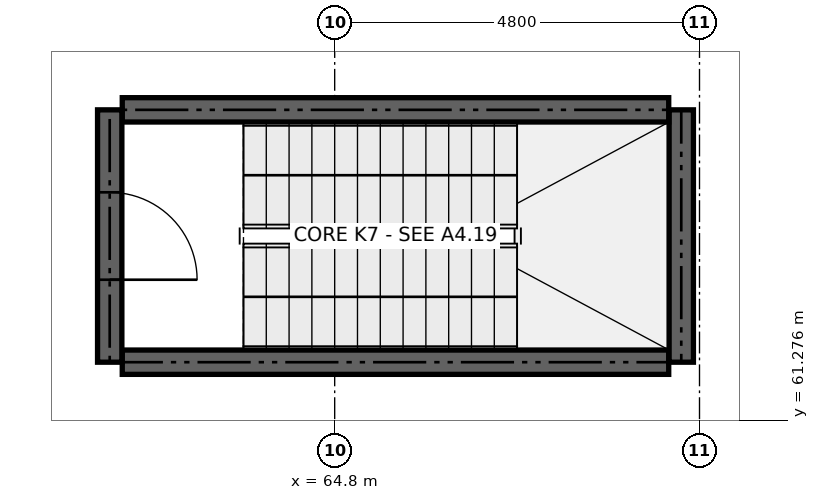
"""IFC4 building model, lengths in metres.
Left out: names, types, materials, properties, quantities, classifications, styles, units other than length and angle.
Written with IfcOpenShell. Run it as: python <this file> out.ifc"""

import sys

from ifc_helpers import new_model, si_unit, direction, frame, frame_2d, origin, place, context, subcontext, project, spatial, rectangle, extrude, element, fill, save


model = new_model("IFC4")
c1 = context("Model", 3, precision=1e-05, world=origin(), true_north=direction((0.0, 1.0)))
c2 = subcontext(c1, "Body", "Model", "MODEL_VIEW")
j1 = project(units=[si_unit("LENGTHUNIT", "METRE"), si_unit("PLANEANGLEUNIT", "RADIAN")], contexts=[c1])
p1 = place(None, origin())
s1 = spatial("IfcSite", under=j1, at=p1, CompositionType="ELEMENT")
p2 = place(p1, origin())
s2 = spatial("IfcBuilding", under=s1, at=p2, CompositionType="ELEMENT")
p3 = place(p2, frame((0.0, 0.0, 5.0)))
s3 = spatial("IfcBuildingStorey", under=s2, at=p3, CompositionType="ELEMENT", Elevation=5.0)
p4 = place(p3, frame((62.005, 62.04, 0.0), z_axis=(0.0, 0.0, 1.0), x_axis=(1.0, 0.0, 0.0)))
e1 = element("IfcWall", 1, at=p4, inside=s3, PredefinedType="SHEAR", context=c2, shape_type="SweptSolid", body=[
    extrude(rectangle(XDim=7.19, YDim=0.32, at=frame_2d((3.595, 0.0))), origin(), (0.0, 0.0, 1.0), 4.2),
])
p5 = place(p3, frame((69.36, 62.04, 0.0), z_axis=(0.0, 0.0, 1.0), x_axis=(0.0, 1.0, 0.0)))
e2 = element("IfcWall", 2, at=p5, inside=s3, PredefinedType="SHEAR", context=c2, shape_type="SweptSolid", body=[
    extrude(rectangle(XDim=3.32, YDim=0.32, at=frame_2d((1.66, 0.0))), origin(), (0.0, 0.0, 1.0), 4.2),
])
p6 = place(p3, frame((69.195, 65.36, 0.0), z_axis=(0.0, 0.0, 1.0), x_axis=(-1.0, 0.0, 0.0)))
e3 = element("IfcWall", 3, at=p6, inside=s3, PredefinedType="SHEAR", context=c2, shape_type="SweptSolid", body=[
    extrude(rectangle(XDim=7.19, YDim=0.32, at=frame_2d((3.595, 0.0))), origin(), (0.0, 0.0, 1.0), 4.2),
])
p7 = place(p3, frame((61.84, 65.36, 0.0), z_axis=(0.0, 0.0, 1.0), x_axis=(0.0, -1.0, 0.0)))
e4 = element("IfcWall", 4, at=p7, inside=s3, PredefinedType="SHEAR", context=c2, shape_type="SweptSolid", body=[
    extrude(rectangle(XDim=3.32, YDim=0.32, at=frame_2d((1.66, 0.0))), origin(), (0.0, 0.0, 1.0), 4.2),
])
p8 = place(p7, frame((1.085, 0.0, 0.0)))
e5 = element("IfcOpeningElement", 5, at=p8, cuts=e4, PredefinedType="OPENING", context=c2, shape_type="SweptSolid", body=[
    extrude(rectangle(XDim=1.15, YDim=2.15, at=frame_2d((0.575, 1.075))), frame((0.0, 0.172, 0.0), z_axis=(0.0, -1.0, 0.0), x_axis=(1.0, 0.0, 0.0)), (0.0, 0.0, 1.0), 0.344),
])
p9 = place(p8, origin())
e6 = element("IfcDoor", 6, at=p9, inside=s3, OperationType="SINGLE_SWING_RIGHT", PredefinedType="DOOR", context=c2, shape_type="SweptSolid", body=[
    extrude(rectangle(XDim=1.15, YDim=2.15, at=frame_2d((0.575, 1.075))), frame((0.0, 0.025, 0.0), z_axis=(0.0, -1.0, 0.0), x_axis=(1.0, 0.0, 0.0)), (0.0, 0.0, 1.0), 0.05),
])
fill(e5, e6)
save(model, sys.argv[1])
